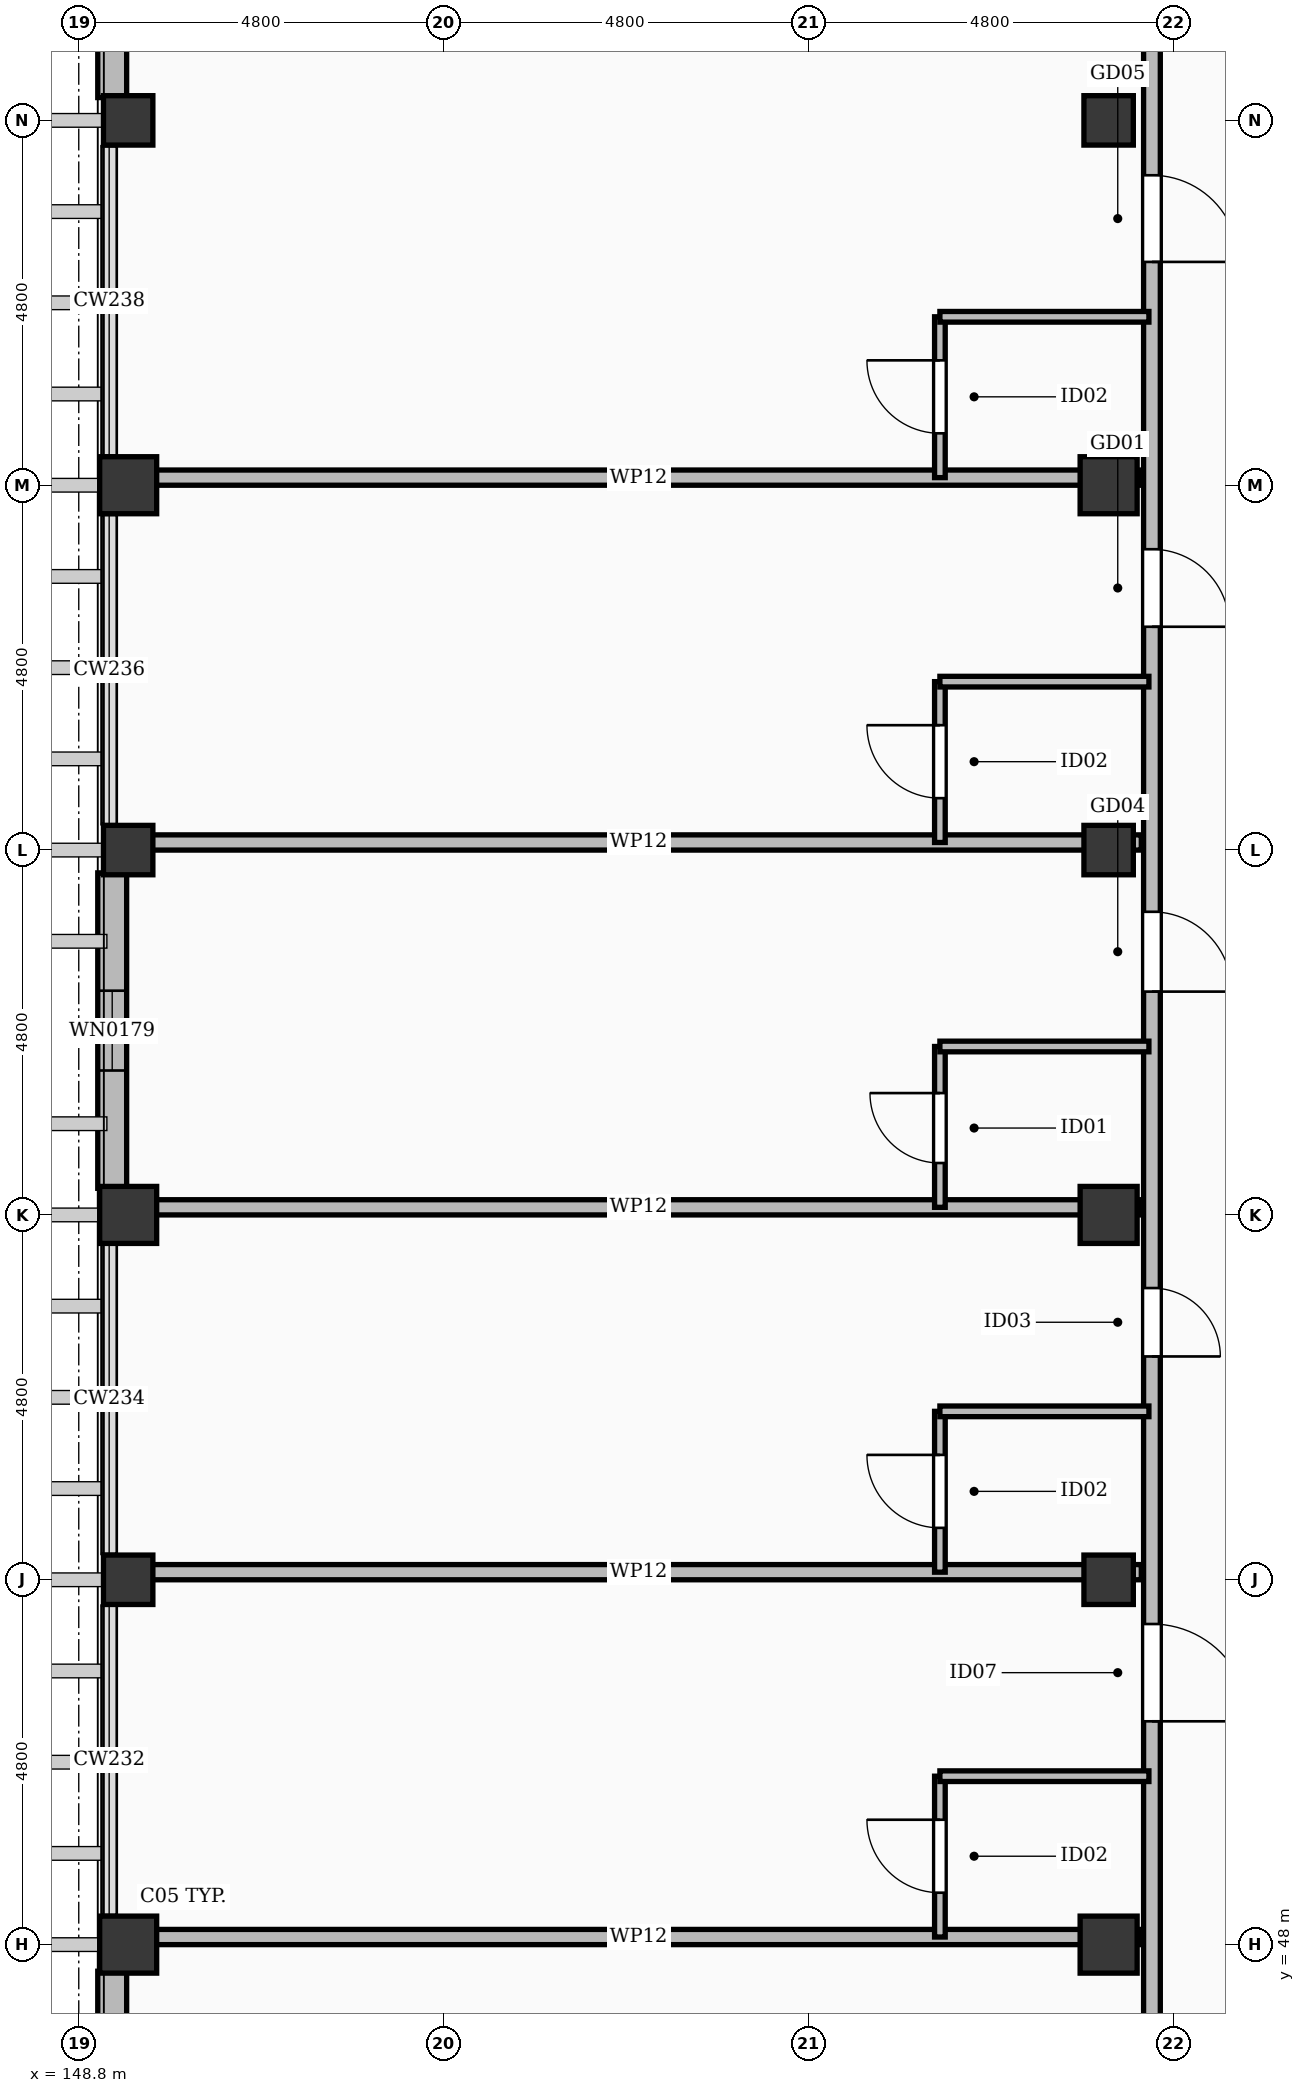
"""IFC4 building model, lengths in metres.
Left out: names, types, materials, properties, quantities, classifications, styles, units other than length and angle.
Written with IfcOpenShell. Run it as: python <this file> out.ifc"""

import sys

from ifc_helpers import new_model, si_unit, direction, frame, frame_2d, origin, origin_2d, place, context, subcontext, project, spatial, rectangle, extrude, element, fill, save


model = new_model("IFC4")
c1 = context("Model", 3, precision=1e-05, world=origin(), true_north=direction((0.0, 1.0)))
c2 = subcontext(c1, "Body", "Model", "MODEL_VIEW")
j1 = project(units=[si_unit("LENGTHUNIT", "METRE"), si_unit("PLANEANGLEUNIT", "RADIAN")], contexts=[c1])
p1 = place(None, origin())
s1 = spatial("IfcSite", under=j1, at=p1, CompositionType="ELEMENT")
p2 = place(p1, origin())
s2 = spatial("IfcBuilding", under=s1, at=p2, CompositionType="ELEMENT")
p3 = place(p2, frame((0.0, 0.0, 28.2)))
s3 = spatial("IfcBuildingStorey", under=s2, at=p3, CompositionType="ELEMENT", Elevation=28.2)
for number, where, z_axis, x_axis in (
    (1, (149.45, 48.0, 0.0), (0.0, 0.0, 1.0), (1.0, 0.0, 0.0)),
    (2, (149.45, 57.6, 0.0), (0.0, 0.0, 1.0), (1.0, 0.0, 0.0)),
    (3, (149.45, 67.2, 0.0), (0.0, 0.0, 1.0), (1.0, 0.0, 0.0)),
    (4, (162.35, 48.0, 0.0), (0.0, 0.0, 1.0), (1.0, 0.0, 0.0)),
    (5, (162.35, 57.6, 0.0), (0.0, 0.0, 1.0), (1.0, 0.0, 0.0)),
    (6, (162.35, 67.2, 0.0), (0.0, 0.0, 1.0), (1.0, 0.0, 0.0)),
):
    element("IfcColumn", number, at=place(p3, frame(where, z_axis=z_axis, x_axis=x_axis)), inside=s3, PredefinedType="COLUMN", context=c2, shape_type="SweptSolid", body=[
        extrude(rectangle(XDim=0.75, YDim=0.75, at=origin_2d()), origin(), (0.0, 0.0, 1.0), 3.6),
    ])
for number, where, z_axis, x_axis in (
    (7, (149.45, 52.8, 0.0), (0.0, 0.0, 1.0), (1.0, 0.0, 0.0)),
    (8, (149.45, 62.4, 0.0), (0.0, 0.0, 1.0), (1.0, 0.0, 0.0)),
    (9, (149.45, 72.0, 0.0), (0.0, 0.0, 1.0), (1.0, 0.0, 0.0)),
    (10, (162.35, 52.8, 0.0), (0.0, 0.0, 1.0), (1.0, 0.0, 0.0)),
    (11, (162.35, 62.4, 0.0), (0.0, 0.0, 1.0), (1.0, 0.0, 0.0)),
    (12, (162.35, 72.0, 0.0), (0.0, 0.0, 1.0), (1.0, 0.0, 0.0)),
):
    element("IfcColumn", number, at=place(p3, frame(where, z_axis=z_axis, x_axis=x_axis)), inside=s3, PredefinedType="COLUMN", context=c2, shape_type="SweptSolid", body=[
        extrude(rectangle(XDim=0.65, YDim=0.65, at=origin_2d()), origin(), (0.0, 0.0, 1.0), 3.6),
    ])
p4 = place(p3, frame((149.24, 43.5, 0.0), z_axis=(0.0, 0.0, 1.0), x_axis=(0.0, 1.0, 0.0)))
e13 = element("IfcWall", 13, at=p4, inside=s3, PredefinedType="SOLIDWALL", context=c2, shape_type="SweptSolid", body=[
    extrude(rectangle(XDim=4.15, YDim=0.38, at=frame_2d((2.075, 0.0))), origin(), (0.0, 0.0, 1.0), 2.682),
])
p5 = place(p4, frame((1.25, 0.0, 0.55)))
e14 = element("IfcOpeningElement", 14, at=p5, cuts=e13, PredefinedType="OPENING", context=c2, shape_type="SweptSolid", body=[
    extrude(rectangle(XDim=1.65, YDim=1.75, at=frame_2d((0.825, 0.875))), frame((0.0, 0.202, 0.0), z_axis=(0.0, -1.0, 0.0), x_axis=(1.0, 0.0, 0.0)), (0.0, 0.0, 1.0), 0.404),
])
p6 = place(p3, frame((149.24, 57.95, 0.0), z_axis=(0.0, 0.0, 1.0), x_axis=(0.0, 1.0, 0.0)))
e15 = element("IfcWall", 15, at=p6, inside=s3, PredefinedType="SOLIDWALL", context=c2, shape_type="SweptSolid", body=[
    extrude(rectangle(XDim=4.15, YDim=0.38, at=frame_2d((2.075, 0.0))), origin(), (0.0, 0.0, 1.0), 2.682),
])
p7 = place(p6, frame((1.55, 0.0, 0.55)))
e16 = element("IfcOpeningElement", 16, at=p7, cuts=e15, PredefinedType="OPENING", context=c2, shape_type="SweptSolid", body=[
    extrude(rectangle(XDim=1.05, YDim=1.65, at=frame_2d((0.525, 0.825))), frame((0.0, 0.202, 0.0), z_axis=(0.0, -1.0, 0.0), x_axis=(1.0, 0.0, 0.0)), (0.0, 0.0, 1.0), 0.404),
])
p8 = place(p3, frame((149.24, 72.3, 0.0), z_axis=(0.0, 0.0, 1.0), x_axis=(0.0, 1.0, 0.0)))
e17 = element("IfcWall", 17, at=p8, inside=s3, PredefinedType="SOLIDWALL", context=c2, shape_type="SweptSolid", body=[
    extrude(rectangle(XDim=4.15, YDim=0.38, at=frame_2d((2.075, 0.0))), origin(), (0.0, 0.0, 1.0), 2.682),
])
p9 = place(p3, frame((162.92, 38.75, 0.0), z_axis=(0.0, 0.0, 1.0), x_axis=(0.0, 1.0, 0.0)))
e18 = element("IfcWall", 18, at=p9, inside=s3, PredefinedType="PARTITIONING", context=c2, shape_type="SweptSolid", body=[
    extrude(rectangle(XDim=34.45, YDim=0.22, at=frame_2d((17.225, 0.0))), origin(), (0.0, 0.0, 1.0), 2.682),
])
p10 = place(p9, frame((5.15, 0.0, 0.0)))
e19 = element("IfcOpeningElement", 19, at=p10, cuts=e18, PredefinedType="OPENING", context=c2, shape_type="SweptSolid", body=[
    extrude(rectangle(XDim=1.02, YDim=2.2, at=frame_2d((0.51, 1.1))), frame((0.0, 0.122, 0.0), z_axis=(0.0, -1.0, 0.0), x_axis=(1.0, 0.0, 0.0)), (0.0, 0.0, 1.0), 0.244),
])
p11 = place(p9, frame((12.188, 0.0, 0.0)))
e20 = element("IfcOpeningElement", 20, at=p11, cuts=e18, PredefinedType="OPENING", context=c2, shape_type="SweptSolid", body=[
    extrude(rectangle(XDim=1.28, YDim=2.16, at=frame_2d((0.64, 1.08))), frame((0.0, 0.122, 0.0), z_axis=(0.0, -1.0, 0.0), x_axis=(1.0, 0.0, 0.0)), (0.0, 0.0, 1.0), 0.244),
])
p12 = place(p9, frame((16.988, 0.0, 0.0)))
e21 = element("IfcOpeningElement", 21, at=p12, cuts=e18, PredefinedType="OPENING", context=c2, shape_type="SweptSolid", body=[
    extrude(rectangle(XDim=0.9, YDim=2.08, at=frame_2d((0.45, 1.04))), frame((0.0, 0.122, 0.0), z_axis=(0.0, -1.0, 0.0), x_axis=(1.0, 0.0, 0.0)), (0.0, 0.0, 1.0), 0.244),
])
p13 = place(p9, frame((21.788, 0.0, 0.0)))
e22 = element("IfcOpeningElement", 22, at=p13, cuts=e18, PredefinedType="OPENING", context=c2, shape_type="SweptSolid", body=[
    extrude(rectangle(XDim=1.05, YDim=2.22, at=frame_2d((0.525, 1.11))), frame((0.0, 0.122, 0.0), z_axis=(0.0, -1.0, 0.0), x_axis=(1.0, 0.0, 0.0)), (0.0, 0.0, 1.0), 0.244),
])
p14 = place(p9, frame((26.588, 0.0, 0.0)))
e23 = element("IfcOpeningElement", 23, at=p14, cuts=e18, PredefinedType="OPENING", context=c2, shape_type="SweptSolid", body=[
    extrude(rectangle(XDim=1.02, YDim=2.2, at=frame_2d((0.51, 1.1))), frame((0.0, 0.122, 0.0), z_axis=(0.0, -1.0, 0.0), x_axis=(1.0, 0.0, 0.0)), (0.0, 0.0, 1.0), 0.244),
])
p15 = place(p9, frame((31.388, 0.0, 0.0)))
e24 = element("IfcOpeningElement", 24, at=p15, cuts=e18, PredefinedType="OPENING", context=c2, shape_type="SweptSolid", body=[
    extrude(rectangle(XDim=1.14, YDim=2.26, at=frame_2d((0.57, 1.13))), frame((0.0, 0.122, 0.0), z_axis=(0.0, -1.0, 0.0), x_axis=(1.0, 0.0, 0.0)), (0.0, 0.0, 1.0), 0.244),
])
p16 = place(p3, frame((149.55, 48.1, 0.0), z_axis=(0.0, 0.0, 1.0), x_axis=(1.0, 0.0, 0.0)))
e25 = element("IfcWall", 25, at=p16, inside=s3, PredefinedType="PARTITIONING", context=c2, shape_type="SweptSolid", body=[
    extrude(rectangle(XDim=13.23, YDim=0.2, at=frame_2d((6.615, 0.0))), origin(), (0.0, 0.0, 1.0), 2.682),
])
p17 = place(p3, frame((160.13, 48.1, 0.0), z_axis=(0.0, 0.0, 1.0), x_axis=(0.0, 1.0, 0.0)))
e26 = element("IfcWall", 26, at=p17, inside=s3, PredefinedType="PARTITIONING", context=c2, shape_type="SweptSolid", body=[
    extrude(rectangle(XDim=2.116, YDim=0.14, at=frame_2d((1.058, 0.0))), origin(), (0.0, 0.0, 1.0), 2.682),
])
p18 = place(p17, frame((0.583, 0.0, 0.0)))
e27 = element("IfcOpeningElement", 27, at=p18, cuts=e26, PredefinedType="OPENING", context=c2, shape_type="SweptSolid", body=[
    extrude(rectangle(XDim=0.96, YDim=2.12, at=frame_2d((0.48, 1.06))), frame((0.0, 0.082, 0.0), z_axis=(0.0, -1.0, 0.0), x_axis=(1.0, 0.0, 0.0)), (0.0, 0.0, 1.0), 0.164),
])
p19 = place(p3, frame((160.13, 50.216, 0.0), z_axis=(0.0, 0.0, 1.0), x_axis=(1.0, 0.0, 0.0)))
e28 = element("IfcWall", 28, at=p19, inside=s3, PredefinedType="PARTITIONING", context=c2, shape_type="SweptSolid", body=[
    extrude(rectangle(XDim=2.75, YDim=0.14, at=frame_2d((1.375, 0.0))), origin(), (0.0, 0.0, 1.0), 2.682),
])
p20 = place(p3, frame((149.55, 52.9, 0.0), z_axis=(0.0, 0.0, 1.0), x_axis=(1.0, 0.0, 0.0)))
e29 = element("IfcWall", 29, at=p20, inside=s3, PredefinedType="PARTITIONING", context=c2, shape_type="SweptSolid", body=[
    extrude(rectangle(XDim=13.23, YDim=0.2, at=frame_2d((6.615, 0.0))), origin(), (0.0, 0.0, 1.0), 2.682),
])
p21 = place(p3, frame((160.13, 52.9, 0.0), z_axis=(0.0, 0.0, 1.0), x_axis=(0.0, 1.0, 0.0)))
e30 = element("IfcWall", 30, at=p21, inside=s3, PredefinedType="PARTITIONING", context=c2, shape_type="SweptSolid", body=[
    extrude(rectangle(XDim=2.116, YDim=0.14, at=frame_2d((1.058, 0.0))), origin(), (0.0, 0.0, 1.0), 2.682),
])
p22 = place(p21, frame((0.583, 0.0, 0.0)))
e31 = element("IfcOpeningElement", 31, at=p22, cuts=e30, PredefinedType="OPENING", context=c2, shape_type="SweptSolid", body=[
    extrude(rectangle(XDim=0.96, YDim=2.12, at=frame_2d((0.48, 1.06))), frame((0.0, 0.082, 0.0), z_axis=(0.0, -1.0, 0.0), x_axis=(1.0, 0.0, 0.0)), (0.0, 0.0, 1.0), 0.164),
])
p23 = place(p3, frame((160.13, 55.016, 0.0), z_axis=(0.0, 0.0, 1.0), x_axis=(1.0, 0.0, 0.0)))
e32 = element("IfcWall", 32, at=p23, inside=s3, PredefinedType="PARTITIONING", context=c2, shape_type="SweptSolid", body=[
    extrude(rectangle(XDim=2.75, YDim=0.14, at=frame_2d((1.375, 0.0))), origin(), (0.0, 0.0, 1.0), 2.682),
])
p24 = place(p3, frame((149.55, 57.7, 0.0), z_axis=(0.0, 0.0, 1.0), x_axis=(1.0, 0.0, 0.0)))
e33 = element("IfcWall", 33, at=p24, inside=s3, PredefinedType="PARTITIONING", context=c2, shape_type="SweptSolid", body=[
    extrude(rectangle(XDim=13.23, YDim=0.2, at=frame_2d((6.615, 0.0))), origin(), (0.0, 0.0, 1.0), 2.682),
])
p25 = place(p3, frame((160.13, 57.7, 0.0), z_axis=(0.0, 0.0, 1.0), x_axis=(0.0, 1.0, 0.0)))
e34 = element("IfcWall", 34, at=p25, inside=s3, PredefinedType="PARTITIONING", context=c2, shape_type="SweptSolid", body=[
    extrude(rectangle(XDim=2.116, YDim=0.14, at=frame_2d((1.058, 0.0))), origin(), (0.0, 0.0, 1.0), 2.682),
])
p26 = place(p25, frame((0.583, 0.0, 0.0)))
e35 = element("IfcOpeningElement", 35, at=p26, cuts=e34, PredefinedType="OPENING", context=c2, shape_type="SweptSolid", body=[
    extrude(rectangle(XDim=0.92, YDim=2.1, at=frame_2d((0.46, 1.05))), frame((0.0, 0.082, 0.0), z_axis=(0.0, -1.0, 0.0), x_axis=(1.0, 0.0, 0.0)), (0.0, 0.0, 1.0), 0.164),
])
p27 = place(p3, frame((160.13, 59.816, 0.0), z_axis=(0.0, 0.0, 1.0), x_axis=(1.0, 0.0, 0.0)))
e36 = element("IfcWall", 36, at=p27, inside=s3, PredefinedType="PARTITIONING", context=c2, shape_type="SweptSolid", body=[
    extrude(rectangle(XDim=2.75, YDim=0.14, at=frame_2d((1.375, 0.0))), origin(), (0.0, 0.0, 1.0), 2.682),
])
p28 = place(p3, frame((149.55, 62.5, 0.0), z_axis=(0.0, 0.0, 1.0), x_axis=(1.0, 0.0, 0.0)))
e37 = element("IfcWall", 37, at=p28, inside=s3, PredefinedType="PARTITIONING", context=c2, shape_type="SweptSolid", body=[
    extrude(rectangle(XDim=13.23, YDim=0.2, at=frame_2d((6.615, 0.0))), origin(), (0.0, 0.0, 1.0), 2.682),
])
p29 = place(p3, frame((160.13, 62.5, 0.0), z_axis=(0.0, 0.0, 1.0), x_axis=(0.0, 1.0, 0.0)))
e38 = element("IfcWall", 38, at=p29, inside=s3, PredefinedType="PARTITIONING", context=c2, shape_type="SweptSolid", body=[
    extrude(rectangle(XDim=2.116, YDim=0.14, at=frame_2d((1.058, 0.0))), origin(), (0.0, 0.0, 1.0), 2.682),
])
p30 = place(p29, frame((0.583, 0.0, 0.0)))
e39 = element("IfcOpeningElement", 39, at=p30, cuts=e38, PredefinedType="OPENING", context=c2, shape_type="SweptSolid", body=[
    extrude(rectangle(XDim=0.96, YDim=2.12, at=frame_2d((0.48, 1.06))), frame((0.0, 0.082, 0.0), z_axis=(0.0, -1.0, 0.0), x_axis=(1.0, 0.0, 0.0)), (0.0, 0.0, 1.0), 0.164),
])
p31 = place(p3, frame((160.13, 64.616, 0.0), z_axis=(0.0, 0.0, 1.0), x_axis=(1.0, 0.0, 0.0)))
e40 = element("IfcWall", 40, at=p31, inside=s3, PredefinedType="PARTITIONING", context=c2, shape_type="SweptSolid", body=[
    extrude(rectangle(XDim=2.75, YDim=0.14, at=frame_2d((1.375, 0.0))), origin(), (0.0, 0.0, 1.0), 2.682),
])
p32 = place(p3, frame((149.55, 67.3, 0.0), z_axis=(0.0, 0.0, 1.0), x_axis=(1.0, 0.0, 0.0)))
e41 = element("IfcWall", 41, at=p32, inside=s3, PredefinedType="PARTITIONING", context=c2, shape_type="SweptSolid", body=[
    extrude(rectangle(XDim=13.23, YDim=0.2, at=frame_2d((6.615, 0.0))), origin(), (0.0, 0.0, 1.0), 2.682),
])
p33 = place(p3, frame((160.13, 67.3, 0.0), z_axis=(0.0, 0.0, 1.0), x_axis=(0.0, 1.0, 0.0)))
e42 = element("IfcWall", 42, at=p33, inside=s3, PredefinedType="PARTITIONING", context=c2, shape_type="SweptSolid", body=[
    extrude(rectangle(XDim=2.116, YDim=0.14, at=frame_2d((1.058, 0.0))), origin(), (0.0, 0.0, 1.0), 2.682),
])
p34 = place(p33, frame((0.583, 0.0, 0.0)))
e43 = element("IfcOpeningElement", 43, at=p34, cuts=e42, PredefinedType="OPENING", context=c2, shape_type="SweptSolid", body=[
    extrude(rectangle(XDim=0.96, YDim=2.12, at=frame_2d((0.48, 1.06))), frame((0.0, 0.082, 0.0), z_axis=(0.0, -1.0, 0.0), x_axis=(1.0, 0.0, 0.0)), (0.0, 0.0, 1.0), 0.164),
])
p35 = place(p3, frame((160.13, 69.416, 0.0), z_axis=(0.0, 0.0, 1.0), x_axis=(1.0, 0.0, 0.0)))
e44 = element("IfcWall", 44, at=p35, inside=s3, PredefinedType="PARTITIONING", context=c2, shape_type="SweptSolid", body=[
    extrude(rectangle(XDim=2.75, YDim=0.14, at=frame_2d((1.375, 0.0))), origin(), (0.0, 0.0, 1.0), 2.682),
])
p36 = place(p7, origin())
e45 = element("IfcWindow", 45, at=p36, inside=s3, PartitioningType="SINGLE_PANEL", PredefinedType="WINDOW", context=c2, shape_type="SweptSolid", body=[
    extrude(rectangle(XDim=1.05, YDim=1.65, at=frame_2d((0.525, 0.825))), frame((0.0, 0.03, 0.0), z_axis=(0.0, -1.0, 0.0), x_axis=(1.0, 0.0, 0.0)), (0.0, 0.0, 1.0), 0.06),
])
fill(e16, e45)
p37 = place(p11, frame((1.28, 0.0, 0.0), z_axis=(0.0, 0.0, 1.0), x_axis=(-1.0, 0.0, 0.0)))
e46 = element("IfcDoor", 46, at=p37, inside=s3, OperationType="SINGLE_SWING_LEFT", PredefinedType="DOOR", context=c2, shape_type="SweptSolid", body=[
    extrude(rectangle(XDim=1.28, YDim=2.16, at=frame_2d((0.64, 1.08))), frame((0.0, 0.025, 0.0), z_axis=(0.0, -1.0, 0.0), x_axis=(1.0, 0.0, 0.0)), (0.0, 0.0, 1.0), 0.05),
])
fill(e20, e46)
p38 = place(p18, origin())
e47 = element("IfcDoor", 47, at=p38, inside=s3, OperationType="SINGLE_SWING_RIGHT", PredefinedType="DOOR", context=c2, shape_type="SweptSolid", body=[
    extrude(rectangle(XDim=0.96, YDim=2.12, at=frame_2d((0.48, 1.06))), frame((0.0, 0.025, 0.0), z_axis=(0.0, -1.0, 0.0), x_axis=(1.0, 0.0, 0.0)), (0.0, 0.0, 1.0), 0.05),
])
fill(e27, e47)
p39 = place(p12, frame((0.9, 0.0, 0.0), z_axis=(0.0, 0.0, 1.0), x_axis=(-1.0, 0.0, 0.0)))
e48 = element("IfcDoor", 48, at=p39, inside=s3, OperationType="SINGLE_SWING_LEFT", PredefinedType="DOOR", context=c2, shape_type="SweptSolid", body=[
    extrude(rectangle(XDim=0.9, YDim=2.08, at=frame_2d((0.45, 1.04))), frame((0.0, 0.025, 0.0), z_axis=(0.0, -1.0, 0.0), x_axis=(1.0, 0.0, 0.0)), (0.0, 0.0, 1.0), 0.05),
])
fill(e21, e48)
p40 = place(p22, origin())
e49 = element("IfcDoor", 49, at=p40, inside=s3, OperationType="SINGLE_SWING_RIGHT", PredefinedType="DOOR", context=c2, shape_type="SweptSolid", body=[
    extrude(rectangle(XDim=0.96, YDim=2.12, at=frame_2d((0.48, 1.06))), frame((0.0, 0.025, 0.0), z_axis=(0.0, -1.0, 0.0), x_axis=(1.0, 0.0, 0.0)), (0.0, 0.0, 1.0), 0.05),
])
fill(e31, e49)
p41 = place(p13, frame((1.05, 0.0, 0.0), z_axis=(0.0, 0.0, 1.0), x_axis=(-1.0, 0.0, 0.0)))
e50 = element("IfcDoor", 50, at=p41, inside=s3, OperationType="SINGLE_SWING_LEFT", PredefinedType="DOOR", context=c2, shape_type="SweptSolid", body=[
    extrude(rectangle(XDim=1.05, YDim=2.22, at=frame_2d((0.525, 1.11))), frame((0.0, 0.025, 0.0), z_axis=(0.0, -1.0, 0.0), x_axis=(1.0, 0.0, 0.0)), (0.0, 0.0, 1.0), 0.05),
])
fill(e22, e50)
p42 = place(p26, origin())
e51 = element("IfcDoor", 51, at=p42, inside=s3, OperationType="SINGLE_SWING_RIGHT", PredefinedType="DOOR", context=c2, shape_type="SweptSolid", body=[
    extrude(rectangle(XDim=0.92, YDim=2.1, at=frame_2d((0.46, 1.05))), frame((0.0, 0.025, 0.0), z_axis=(0.0, -1.0, 0.0), x_axis=(1.0, 0.0, 0.0)), (0.0, 0.0, 1.0), 0.05),
])
fill(e35, e51)
p43 = place(p14, frame((1.02, 0.0, 0.0), z_axis=(0.0, 0.0, 1.0), x_axis=(-1.0, 0.0, 0.0)))
e52 = element("IfcDoor", 52, at=p43, inside=s3, OperationType="SINGLE_SWING_LEFT", PredefinedType="DOOR", context=c2, shape_type="SweptSolid", body=[
    extrude(rectangle(XDim=1.02, YDim=2.2, at=frame_2d((0.51, 1.1))), frame((0.0, 0.025, 0.0), z_axis=(0.0, -1.0, 0.0), x_axis=(1.0, 0.0, 0.0)), (0.0, 0.0, 1.0), 0.05),
])
fill(e23, e52)
p44 = place(p30, origin())
e53 = element("IfcDoor", 53, at=p44, inside=s3, OperationType="SINGLE_SWING_RIGHT", PredefinedType="DOOR", context=c2, shape_type="SweptSolid", body=[
    extrude(rectangle(XDim=0.96, YDim=2.12, at=frame_2d((0.48, 1.06))), frame((0.0, 0.025, 0.0), z_axis=(0.0, -1.0, 0.0), x_axis=(1.0, 0.0, 0.0)), (0.0, 0.0, 1.0), 0.05),
])
fill(e39, e53)
p45 = place(p15, frame((1.14, 0.0, 0.0), z_axis=(0.0, 0.0, 1.0), x_axis=(-1.0, 0.0, 0.0)))
e54 = element("IfcDoor", 54, at=p45, inside=s3, OperationType="SINGLE_SWING_LEFT", PredefinedType="DOOR", context=c2, shape_type="SweptSolid", body=[
    extrude(rectangle(XDim=1.14, YDim=2.26, at=frame_2d((0.57, 1.13))), frame((0.0, 0.025, 0.0), z_axis=(0.0, -1.0, 0.0), x_axis=(1.0, 0.0, 0.0)), (0.0, 0.0, 1.0), 0.05),
])
fill(e24, e54)
p46 = place(p34, origin())
e55 = element("IfcDoor", 55, at=p46, inside=s3, OperationType="SINGLE_SWING_RIGHT", PredefinedType="DOOR", context=c2, shape_type="SweptSolid", body=[
    extrude(rectangle(XDim=0.96, YDim=2.12, at=frame_2d((0.48, 1.06))), frame((0.0, 0.025, 0.0), z_axis=(0.0, -1.0, 0.0), x_axis=(1.0, 0.0, 0.0)), (0.0, 0.0, 1.0), 0.05),
])
fill(e43, e55)
save(model, sys.argv[1])
